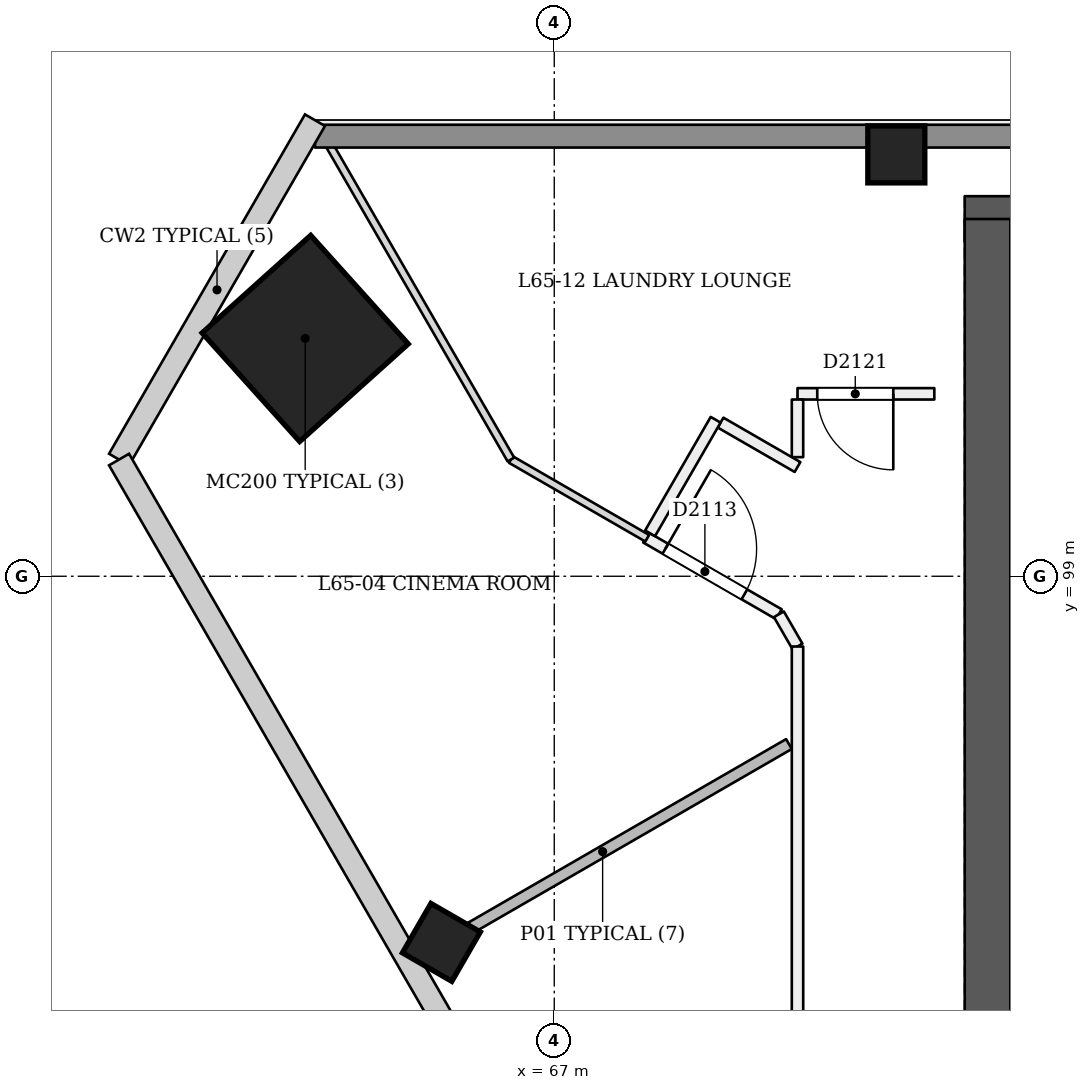
"""IFC4 building model, lengths in metres.
Left out: names, types, materials, properties, quantities, classifications, styles, units other than length and angle.
Written with IfcOpenShell. Run it as: python <this file> out.ifc"""

import sys

from ifc_helpers import new_model, si_unit, direction, frame, frame_2d, origin, origin_2d, place, context, subcontext, project, spatial, rectangle, extrude, element, fill, save


model = new_model("IFC4")
c1 = context("Model", 3, precision=1e-05, world=origin(), true_north=direction((0.0, 1.0)))
c2 = subcontext(c1, "Body", "Model", "MODEL_VIEW")
j1 = project(units=[si_unit("LENGTHUNIT", "METRE"), si_unit("PLANEANGLEUNIT", "RADIAN")], contexts=[c1])
p1 = place(None, origin())
s1 = spatial("IfcSite", under=j1, at=p1, CompositionType="ELEMENT")
p2 = place(p1, origin())
s2 = spatial("IfcBuilding", under=s1, at=p2, CompositionType="ELEMENT")
p3 = place(p2, frame((0.0, 0.0, 253.6)))
s3 = spatial("IfcBuildingStorey", under=s2, at=p3, CompositionType="ELEMENT", Elevation=253.6)
p4 = place(p3, frame((72.7, 93.1, 0.0), z_axis=(0.0, 0.0, 1.0), x_axis=(1.0, 0.0, 0.0)))
e1 = element("IfcWall", 1, at=p4, inside=s3, PredefinedType="SHEAR", context=c2, shape_type="SweptSolid", body=[
    extrude(rectangle(XDim=24.9, YDim=0.6, at=frame_2d((12.45, 0.0))), origin(), (0.0, 0.0, 1.0), 3.6),
])
p5 = place(p4, frame((1.1, 0.0, 0.0)))
e2 = element("IfcOpeningElement", 2, at=p5, cuts=e1, PredefinedType="OPENING", context=c2, shape_type="SweptSolid", body=[
    extrude(rectangle(XDim=1.2, YDim=2.1, at=frame_2d((0.6, 1.05))), frame((0.0, 0.311, 0.0), z_axis=(0.0, -1.0, 0.0), x_axis=(1.0, 0.0, 0.0)), (0.0, 0.0, 1.0), 0.621),
])
p6 = place(p4, frame((3.3, 0.0, 0.0)))
e3 = element("IfcOpeningElement", 3, at=p6, cuts=e1, PredefinedType="OPENING", context=c2, shape_type="SweptSolid", body=[
    extrude(rectangle(XDim=1.2, YDim=2.1, at=frame_2d((0.6, 1.05))), frame((0.0, 0.311, 0.0), z_axis=(0.0, -1.0, 0.0), x_axis=(1.0, 0.0, 0.0)), (0.0, 0.0, 1.0), 0.621),
])
p7 = place(p4, frame((13.3, 0.0, 0.0)))
e4 = element("IfcOpeningElement", 4, at=p7, cuts=e1, PredefinedType="OPENING", context=c2, shape_type="SweptSolid", body=[
    extrude(rectangle(XDim=1.2, YDim=2.1, at=frame_2d((0.6, 1.05))), frame((0.0, 0.311, 0.0), z_axis=(0.0, -1.0, 0.0), x_axis=(1.0, 0.0, 0.0)), (0.0, 0.0, 1.0), 0.621),
])
p8 = place(p4, frame((16.012, 0.0, 0.0)))
e5 = element("IfcOpeningElement", 5, at=p8, cuts=e1, PredefinedType="OPENING", context=c2, shape_type="SweptSolid", body=[
    extrude(rectangle(XDim=1.0, YDim=2.1, at=frame_2d((0.5, 1.05))), frame((0.0, 0.311, 0.0), z_axis=(0.0, -1.0, 0.0), x_axis=(1.0, 0.0, 0.0)), (0.0, 0.0, 1.0), 0.621),
])
p9 = place(p4, frame((19.9, 0.0, 0.0)))
e6 = element("IfcOpeningElement", 6, at=p9, cuts=e1, PredefinedType="OPENING", context=c2, shape_type="SweptSolid", body=[
    extrude(rectangle(XDim=1.0, YDim=2.1, at=frame_2d((0.5, 1.05))), frame((0.0, 0.311, 0.0), z_axis=(0.0, -1.0, 0.0), x_axis=(1.0, 0.0, 0.0)), (0.0, 0.0, 1.0), 0.621),
])
p10 = place(p4, frame((23.038, 0.0, 0.0)))
e7 = element("IfcOpeningElement", 7, at=p10, cuts=e1, PredefinedType="OPENING", context=c2, shape_type="SweptSolid", body=[
    extrude(rectangle(XDim=1.0, YDim=2.1, at=frame_2d((0.5, 1.05))), frame((0.0, 0.311, 0.0), z_axis=(0.0, -1.0, 0.0), x_axis=(1.0, 0.0, 0.0)), (0.0, 0.0, 1.0), 0.621),
])
p11 = place(p3, frame((97.3, 103.7, 0.0), z_axis=(0.0, 0.0, 1.0), x_axis=(-1.0, 0.0, 0.0)))
e8 = element("IfcWall", 8, at=p11, inside=s3, PredefinedType="SHEAR", context=c2, shape_type="SweptSolid", body=[
    extrude(rectangle(XDim=24.9, YDim=0.6, at=frame_2d((12.45, 0.0))), origin(), (0.0, 0.0, 1.0), 3.6),
])
p12 = place(p3, frame((72.7, 103.7, 0.0), z_axis=(0.0, 0.0, 1.0), x_axis=(0.0, -1.0, 0.0)))
e9 = element("IfcWall", 9, at=p12, inside=s3, PredefinedType="SHEAR", context=c2, shape_type="SweptSolid", body=[
    extrude(rectangle(XDim=10.9, YDim=0.6, at=frame_2d((5.45, 0.0))), origin(), (0.0, 0.0, 1.0), 3.6),
])
p13 = place(p3, frame((63.689, 102.118, 0.0), z_axis=(0.028403721265, 0.009287135593, 0.999553389135), x_axis=(-0.866201868799, 0.499294814231, 0.019975258968)))
e10 = element("IfcColumn", 10, at=p13, inside=s3, PredefinedType="COLUMN", context=c2, shape_type="SweptSolid", body=[
    extrude(rectangle(XDim=1.92, YDim=1.92, at=origin_2d()), origin(), (0.0, 0.0, 1.0), 3.602),
])
p14 = place(p3, frame((71.5, 104.55, 0.0), z_axis=(0.0, 0.0, 1.0), x_axis=(1.0, 0.0, 0.0)))
e11 = element("IfcColumn", 11, at=p14, inside=s3, PredefinedType="COLUMN", context=c2, shape_type="SweptSolid", body=[
    extrude(rectangle(XDim=0.75, YDim=0.75, at=origin_2d()), origin(), (0.0, 0.0, 1.0), 3.6),
])
p15 = place(p3, frame((65.488, 94.136, -0.023), z_axis=(0.022221406801, 0.038413224561, 0.999014831351), x_axis=(-0.866024074112, -0.498523102043, 0.038432015134)))
e12 = element("IfcColumn", 12, at=p15, inside=s3, PredefinedType="COLUMN", context=c2, shape_type="SweptSolid", body=[
    extrude(rectangle(XDim=0.75, YDim=0.75, at=origin_2d()), origin(), (0.0, 0.0, 1.0), 3.604),
])
p16 = place(p3, frame((68.206, 99.51, 0.0), z_axis=(0.0, 0.0, 1.0), x_axis=(0.866010470582, -0.500025864173, 0.0)))
e13 = element("IfcWall", 13, at=p16, inside=s3, PredefinedType="PARTITIONING", context=c2, shape_type="SweptSolid", body=[
    extrude(rectangle(XDim=2.02, YDim=0.15, at=frame_2d((1.01, 0.0))), origin(), (0.0, 0.0, 1.0), 3.2),
])
p17 = place(p16, frame((0.296, 0.0, 0.0)))
e14 = element("IfcOpeningElement", 14, at=p17, cuts=e13, PredefinedType="OPENING", context=c2, shape_type="SweptSolid", body=[
    extrude(rectangle(XDim=1.2, YDim=2.1, at=frame_2d((0.6, 1.05))), frame((0.0, 0.085, 0.0), z_axis=(0.0, -1.0, 0.0), x_axis=(1.0, 0.0, 0.0)), (0.0, 0.0, 1.0), 0.171),
])
p18 = place(p3, frame((69.955, 98.5, 0.0), z_axis=(0.0, 0.0, 1.0), x_axis=(0.499837493736, -0.866119206493, 0.0)))
e15 = element("IfcWall", 15, at=p18, inside=s3, PredefinedType="PARTITIONING", context=c2, shape_type="SweptSolid", body=[
    extrude(rectangle(XDim=0.49, YDim=0.15, at=frame_2d((0.245, 0.0))), origin(), (0.0, 0.0, 1.0), 3.2),
])
p19 = place(p3, frame((70.2, 98.076, 0.0), z_axis=(0.0, 0.0, 1.0), x_axis=(0.0, -1.0, 0.0)))
e16 = element("IfcWall", 16, at=p19, inside=s3, PredefinedType="PARTITIONING", context=c2, shape_type="SweptSolid", body=[
    extrude(rectangle(XDim=7.476, YDim=0.15, at=frame_2d((3.738, 0.0))), origin(), (0.0, 0.0, 1.0), 3.2),
])
p20 = place(p3, frame((72.0, 101.4, 0.0), z_axis=(0.0, 0.0, 1.0), x_axis=(-1.0, 0.0, 0.0)))
e17 = element("IfcWall", 17, at=p20, inside=s3, PredefinedType="PARTITIONING", context=c2, shape_type="SweptSolid", body=[
    extrude(rectangle(XDim=1.8, YDim=0.15, at=frame_2d((0.9, 0.0))), origin(), (0.0, 0.0, 1.0), 3.2),
])
p21 = place(p20, frame((0.54, 0.0, 0.0)))
e18 = element("IfcOpeningElement", 18, at=p21, cuts=e17, PredefinedType="OPENING", context=c2, shape_type="SweptSolid", body=[
    extrude(rectangle(XDim=1.0, YDim=2.1, at=frame_2d((0.5, 1.05))), frame((0.0, 0.085, 0.0), z_axis=(0.0, -1.0, 0.0), x_axis=(1.0, 0.0, 0.0)), (0.0, 0.0, 1.0), 0.171),
])
p22 = place(p3, frame((70.2, 101.325, 0.0), z_axis=(0.0, 0.0, 1.0), x_axis=(0.0, -1.0, 0.0)))
e19 = element("IfcWall", 19, at=p22, inside=s3, PredefinedType="PARTITIONING", context=c2, shape_type="SweptSolid", body=[
    extrude(rectangle(XDim=0.758, YDim=0.15, at=frame_2d((0.379, 0.0))), origin(), (0.0, 0.0, 1.0), 3.2),
])
p23 = place(p3, frame((70.2, 100.437, 0.0), z_axis=(0.0, 0.0, 1.0), x_axis=(-0.86603597662, 0.499981686864, 0.0)))
e20 = element("IfcWall", 20, at=p23, inside=s3, PredefinedType="PARTITIONING", context=c2, shape_type="SweptSolid", body=[
    extrude(rectangle(XDim=1.168, YDim=0.15, at=frame_2d((0.584, 0.0))), origin(), (0.0, 0.0, 1.0), 3.2),
])
p24 = place(p3, frame((69.123, 101.059, 0.0), z_axis=(0.0, 0.0, 1.0), x_axis=(-0.500020560727, -0.866013532718, 0.0)))
e21 = element("IfcWall", 21, at=p24, inside=s3, PredefinedType="PARTITIONING", context=c2, shape_type="SweptSolid", body=[
    extrude(rectangle(XDim=1.725, YDim=0.15, at=frame_2d((0.863, 0.0))), origin(), (0.0, 0.0, 1.0), 3.2),
])
p25 = place(p3, frame((65.185, 93.962, 0.0), z_axis=(0.0, 0.0, 1.0), x_axis=(0.866029015679, 0.499993743963, 0.0)))
e22 = element("IfcWall", 22, at=p25, inside=s3, PredefinedType="PARTITIONING", context=c2, shape_type="SweptSolid", body=[
    extrude(rectangle(XDim=5.661, YDim=0.15, at=frame_2d((2.83, 0.0))), origin(), (0.0, 0.0, 1.0), 2.7),
])
p26 = place(p3, frame((68.223, 99.5, 0.0), z_axis=(0.0, 0.0, 1.0), x_axis=(-0.866065849335, 0.499929939707, 0.0)))
e23 = element("IfcWall", 23, at=p26, inside=s3, PredefinedType="PARTITIONING", context=c2, shape_type="SweptSolid", body=[
    extrude(rectangle(XDim=2.071, YDim=0.1, at=frame_2d((1.036, 0.0))), origin(), (0.0, 0.0, 1.0), 3.2),
])
p27 = place(p3, frame((66.429, 100.535, 0.0), z_axis=(0.0, 0.0, 1.0), x_axis=(-0.499989435719, 0.866031502989, 0.0)))
e24 = element("IfcWall", 24, at=p27, inside=s3, PredefinedType="PARTITIONING", context=c2, shape_type="SweptSolid", body=[
    extrude(rectangle(XDim=5.04, YDim=0.1, at=frame_2d((2.52, 0.0))), origin(), (0.0, 0.0, 1.0), 2.7),
])
p28 = place(p3, frame((63.852, 104.79, 0.0), z_axis=(0.0, 0.0, 1.0), x_axis=(1.0, 0.0, 0.0)))
e25 = element("IfcWall", 25, at=p28, inside=s3, PredefinedType="SOLIDWALL", context=c2, shape_type="SweptSolid", body=[
    extrude(rectangle(XDim=42.296, YDim=0.3, at=frame_2d((21.148, 0.0))), origin(), (0.0, 0.0, 1.0), 2.7),
])
p29 = place(p17, origin())
e26 = element("IfcDoor", 26, at=p29, inside=s3, OperationType="SINGLE_SWING_LEFT", PredefinedType="NOTDEFINED", context=c2, shape_type="SweptSolid", body=[
    extrude(rectangle(XDim=1.2, YDim=2.1, at=frame_2d((0.6, 1.05))), frame((0.0, 0.025, 0.0), z_axis=(0.0, -1.0, 0.0), x_axis=(1.0, 0.0, 0.0)), (0.0, 0.0, 1.0), 0.05),
])
fill(e14, e26)
p30 = place(p21, origin())
e27 = element("IfcDoor", 27, at=p30, inside=s3, OperationType="SINGLE_SWING_LEFT", PredefinedType="NOTDEFINED", context=c2, shape_type="SweptSolid", body=[
    extrude(rectangle(XDim=1.0, YDim=2.1, at=frame_2d((0.5, 1.05))), frame((0.0, 0.025, 0.0), z_axis=(0.0, -1.0, 0.0), x_axis=(1.0, 0.0, 0.0)), (0.0, 0.0, 1.0), 0.05),
])
fill(e18, e27)
save(model, sys.argv[1])
